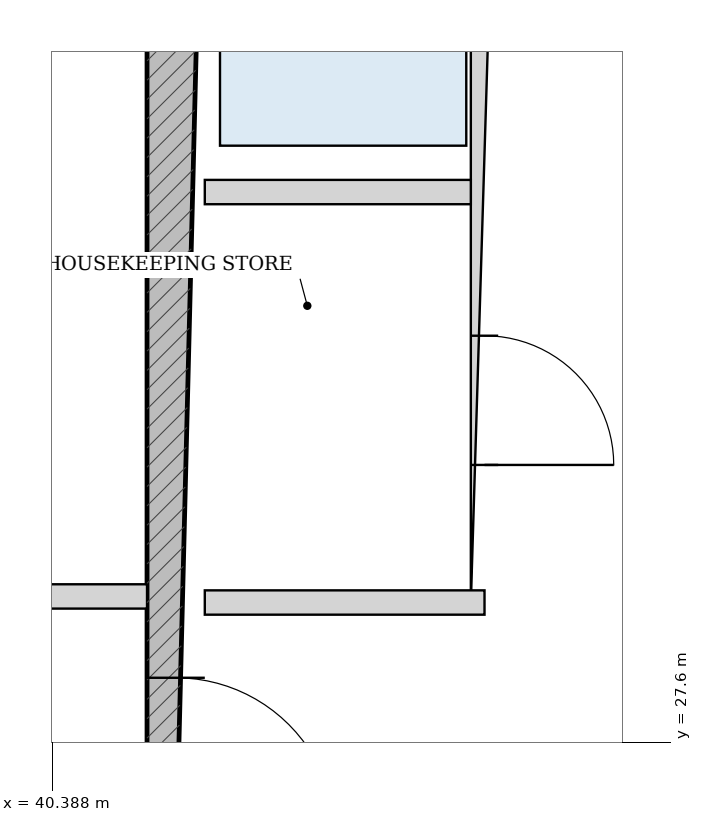
"""IFC4 building model, lengths in metres.
Left out: names, types, materials, properties, quantities, classifications, styles, units other than length and angle.
Written with IfcOpenShell. Run it as: python <this file> out.ifc"""

import sys

from ifc_helpers import new_model, si_unit, direction, frame, frame_2d, origin, place, context, subcontext, project, spatial, rectangle, extrude, source, transform, mapped, element, fill, save


model = new_model("IFC4")
c1 = context("Model", 3, precision=1e-05, world=origin(), true_north=direction((-0.2419218956, 0.970295726276)))
c2 = subcontext(c1, "Body", "Model", "MODEL_VIEW")
j1 = project(units=[si_unit("LENGTHUNIT", "METRE"), si_unit("PLANEANGLEUNIT", "RADIAN")], contexts=[c1])
p1 = place(None, origin())
s1 = spatial("IfcSite", under=j1, at=p1, CompositionType="ELEMENT")
p2 = place(p1, origin())
s2 = spatial("IfcBuilding", under=s1, at=p2, CompositionType="ELEMENT")
p3 = place(p2, frame((0.0, 0.0, 167.8)))
s3 = spatial("IfcBuildingStorey", under=s2, at=p3, CompositionType="ELEMENT", Elevation=167.8)
p4 = place(p3, frame((41.2, 19.175, 0.0), z_axis=(0.0, 0.0, 1.0), x_axis=(0.0, 1.0, 0.0)))
e1 = element("IfcWall", 1, at=p4, inside=s3, PredefinedType="SHEAR", context=c2, shape_type="SweptSolid", body=[
    extrude(rectangle(XDim=15.25, YDim=0.38, at=frame_2d((7.625, 0.0))), origin(), (0.0, 0.0, 1.0), 3.33),
])
p5 = place(p4, frame((7.8, 0.0, 0.0)))
e2 = element("IfcOpeningElement", 2, at=p5, cuts=e1, PredefinedType="OPENING", context=c2, shape_type="SweptSolid", body=[
    extrude(rectangle(XDim=1.05, YDim=2.15, at=frame_2d((0.525, 1.075))), frame((0.0, 0.2, 0.0), z_axis=(0.0, -1.0, 0.0), x_axis=(1.0, 0.0, 0.0)), (0.0, 0.0, 1.0), 0.4),
])
p6 = place(p3, frame((43.23, 28.52, 0.0), z_axis=(0.0, 0.0, 1.0), x_axis=(0.0, 1.0, 0.0)))
e3 = element("IfcWall", 3, at=p6, inside=s3, PredefinedType="PARTITIONING", context=c2, shape_type="SweptSolid", body=[
    extrude(rectangle(XDim=5.905, YDim=0.18, at=frame_2d((2.953, 0.0))), origin(), (0.0, 0.0, 1.0), 3.33),
])
p7 = place(p6, frame((0.905, 0.0, 0.0)))
e4 = element("IfcOpeningElement", 4, at=p7, cuts=e3, PredefinedType="OPENING", context=c2, shape_type="SweptSolid", body=[
    extrude(rectangle(XDim=0.85, YDim=2.1, at=frame_2d((0.425, 1.05))), frame((0.0, 0.1, 0.0), z_axis=(0.0, -1.0, 0.0), x_axis=(1.0, 0.0, 0.0)), (0.0, 0.0, 1.0), 0.2),
])
p8 = place(p6, frame((3.655, 0.0, 0.0)))
e5 = element("IfcOpeningElement", 5, at=p8, cuts=e3, PredefinedType="OPENING", context=c2, shape_type="SweptSolid", body=[
    extrude(rectangle(XDim=1.15, YDim=2.2, at=frame_2d((0.575, 1.1))), frame((0.0, 0.1, 0.0), z_axis=(0.0, -1.0, 0.0), x_axis=(1.0, 0.0, 0.0)), (0.0, 0.0, 1.0), 0.2),
])
p9 = place(p3, frame((41.39, 31.22, 0.0), z_axis=(0.0, 0.0, 1.0), x_axis=(1.0, 0.0, 0.0)))
e6 = element("IfcWall", 6, at=p9, inside=s3, PredefinedType="PARTITIONING", context=c2, shape_type="SweptSolid", body=[
    extrude(rectangle(XDim=1.75, YDim=0.16, at=frame_2d((0.875, 0.0))), origin(), (0.0, 0.0, 1.0), 3.33),
])
p10 = place(p3, frame((41.39, 28.52, 0.0), z_axis=(0.0, 0.0, 1.0), x_axis=(1.0, 0.0, 0.0)))
e7 = element("IfcWall", 7, at=p10, inside=s3, PredefinedType="PARTITIONING", context=c2, shape_type="SweptSolid", body=[
    extrude(rectangle(XDim=1.84, YDim=0.16, at=frame_2d((0.92, 0.0))), origin(), (0.0, 0.0, 1.0), 3.33),
])
p11 = place(p3, frame((34.99, 28.56, 0.0), z_axis=(0.0, 0.0, 1.0), x_axis=(1.0, 0.0, 0.0)))
e8 = element("IfcWall", 8, at=p11, inside=s3, PredefinedType="PARTITIONING", context=c2, shape_type="SweptSolid", body=[
    extrude(rectangle(XDim=6.02, YDim=0.16, at=frame_2d((3.01, 0.0))), origin(), (0.0, 0.0, 1.0), 3.33),
])
p12 = place(p11, frame((1.025, 0.0, 0.0)))
e9 = element("IfcOpeningElement", 9, at=p12, cuts=e8, PredefinedType="OPENING", context=c2, shape_type="SweptSolid", body=[
    extrude(rectangle(XDim=0.86, YDim=2.1, at=frame_2d((0.43, 1.05))), frame((0.0, 0.09, 0.0), z_axis=(0.0, -1.0, 0.0), x_axis=(1.0, 0.0, 0.0)), (0.0, 0.0, 1.0), 0.18),
])
p13 = place(p11, frame((4.14, 0.0, 0.0)))
e10 = element("IfcOpeningElement", 10, at=p13, cuts=e8, PredefinedType="OPENING", context=c2, shape_type="SweptSolid", body=[
    extrude(rectangle(XDim=0.85, YDim=2.1, at=frame_2d((0.425, 1.05))), frame((0.0, 0.09, 0.0), z_axis=(0.0, -1.0, 0.0), x_axis=(1.0, 0.0, 0.0)), (0.0, 0.0, 1.0), 0.18),
])
m1 = source(origin(), c2, "Body", "SweptSolid", [
    extrude(rectangle(XDim=1.05, YDim=2.15, at=frame_2d((0.525, 1.075))), frame((0.0, 0.025, 0.0), z_axis=(0.0, -1.0, 0.0), x_axis=(1.0, 0.0, 0.0)), (0.0, 0.0, 1.0), 0.05),
])
p14 = place(p5, frame((1.05, 0.0, 0.0), z_axis=(0.0, 0.0, 1.0), x_axis=(-1.0, 0.0, 0.0)))
e11 = element("IfcDoor", 11, at=p14, inside=s3, OperationType="SINGLE_SWING_RIGHT", PredefinedType="DOOR", context=c2, shape_type="MappedRepresentation", body=[
    mapped(m1, transform((0.0, 0.0, 0.0), scale=1.0)),
])
fill(e2, e11)
m2 = source(origin(), c2, "Body", "SweptSolid", [
    extrude(rectangle(XDim=0.85, YDim=2.1, at=frame_2d((0.425, 1.05))), frame((0.0, 0.025, 0.0), z_axis=(0.0, -1.0, 0.0), x_axis=(1.0, 0.0, 0.0)), (0.0, 0.0, 1.0), 0.05),
])
p15 = place(p7, frame((0.85, 0.0, 0.0), z_axis=(0.0, 0.0, 1.0), x_axis=(-1.0, 0.0, 0.0)))
e12 = element("IfcDoor", 12, at=p15, inside=s3, OperationType="SINGLE_SWING_RIGHT", PredefinedType="DOOR", context=c2, shape_type="MappedRepresentation", body=[
    mapped(m2, transform((0.0, 0.0, 0.0), scale=1.0)),
])
fill(e4, e12)
save(model, sys.argv[1])
